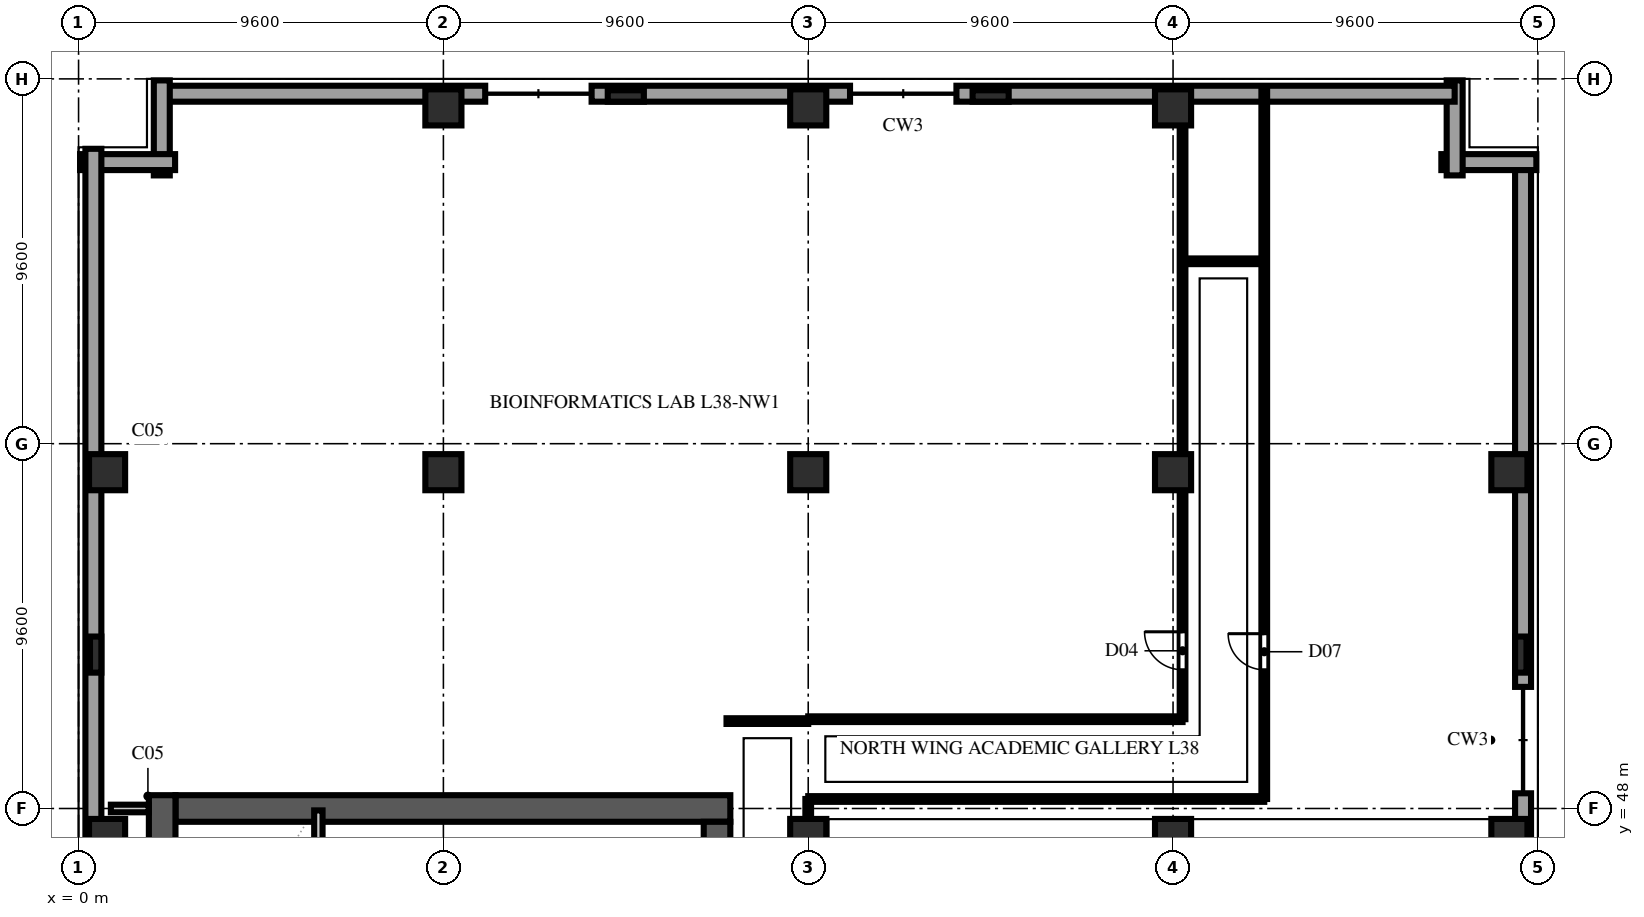
"""IFC4 building model, lengths in metres.
Left out: names, types, materials, properties, quantities, classifications, styles, units other than length and angle.
Written with IfcOpenShell. Run it as: python <this file> out.ifc"""

import sys

from ifc_helpers import new_model, si_unit, direction, frame, frame_2d, origin, origin_2d, place, context, subcontext, project, spatial, rectangle, extrude, element, fill, save


model = new_model("IFC4")
c1 = context("Model", 3, precision=1e-05, world=origin(), true_north=direction((0.0, 1.0)))
c2 = subcontext(c1, "Body", "Model", "MODEL_VIEW")
j1 = project(units=[si_unit("LENGTHUNIT", "METRE"), si_unit("PLANEANGLEUNIT", "RADIAN")], contexts=[c1])
p1 = place(None, origin())
s1 = spatial("IfcSite", under=j1, at=p1, CompositionType="ELEMENT")
p2 = place(p1, origin())
s2 = spatial("IfcBuilding", under=s1, at=p2, CompositionType="ELEMENT")
p3 = place(p2, frame((0.0, 0.0, 150.8)))
s3 = spatial("IfcBuildingStorey", under=s2, at=p3, CompositionType="ELEMENT", Elevation=150.8)
p4 = place(p3, frame((2.55, 48.0, 0.0), z_axis=(0.0, 0.0, 1.0), x_axis=(1.0, 0.0, 0.0)))
e1 = element("IfcWall", 1, at=p4, inside=s3, PredefinedType="SHEAR", context=c2, shape_type="SweptSolid", body=[
    extrude(rectangle(XDim=14.6, YDim=0.7, at=frame_2d((7.3, 0.0))), origin(), (0.0, 0.0, 1.0), 4.94),
])
p5 = place(p3, frame((2.2, 9.25, 0.0), z_axis=(0.0, 0.0, 1.0), x_axis=(0.0, 1.0, 0.0)))
e2 = element("IfcWall", 2, at=p5, inside=s3, PredefinedType="SHEAR", context=c2, shape_type="SweptSolid", body=[
    extrude(rectangle(XDim=39.1, YDim=0.7, at=frame_2d((19.55, 0.0))), origin(), (0.0, 0.0, 1.0), 4.94),
])
p6 = place(p3, frame((16.8, 36.4, 0.0), z_axis=(0.0, 0.0, 1.0), x_axis=(0.0, 1.0, 0.0)))
e3 = element("IfcWall", 3, at=p6, inside=s3, PredefinedType="SHEAR", context=c2, shape_type="SweptSolid", body=[
    extrude(rectangle(XDim=11.25, YDim=0.7, at=frame_2d((5.625, 0.0))), origin(), (0.0, 0.0, 1.0), 4.94),
])
p7 = place(p6, frame((9.2, 0.0, 0.0)))
e4 = element("IfcOpeningElement", 4, at=p7, cuts=e3, PredefinedType="OPENING", context=c2, shape_type="SweptSolid", body=[
    extrude(rectangle(XDim=0.95, YDim=2.15, at=frame_2d((0.475, 1.075))), frame((0.0, 0.362, 0.0), z_axis=(0.0, -1.0, 0.0), x_axis=(1.0, 0.0, 0.0)), (0.0, 0.0, 1.0), 0.724),
])
for number, where, z_axis, x_axis in (
    (5, (0.75, 47.25, 0.0), (0.0, 0.0, 1.0), (1.0, 0.0, 0.0)),
    (6, (0.75, 56.85, 0.0), (0.0, 0.0, 1.0), (1.0, 0.0, 0.0)),
    (7, (9.6, 56.85, 0.0), (0.0, 0.0, 1.0), (1.0, 0.0, 0.0)),
    (8, (9.6, 66.45, 0.0), (0.0, 0.0, 1.0), (1.0, 0.0, 0.0)),
    (9, (19.2, 47.25, 0.0), (0.0, 0.0, 1.0), (1.0, 0.0, 0.0)),
    (10, (19.2, 56.85, 0.0), (0.0, 0.0, 1.0), (1.0, 0.0, 0.0)),
    (11, (19.2, 66.45, 0.0), (0.0, 0.0, 1.0), (1.0, 0.0, 0.0)),
    (12, (28.8, 47.25, 0.0), (0.0, 0.0, 1.0), (1.0, 0.0, 0.0)),
    (13, (28.8, 56.85, 0.0), (0.0, 0.0, 1.0), (1.0, 0.0, 0.0)),
    (14, (28.8, 66.45, 0.0), (0.0, 0.0, 1.0), (1.0, 0.0, 0.0)),
    (15, (37.65, 47.25, 0.0), (0.0, 0.0, 1.0), (1.0, 0.0, 0.0)),
    (16, (37.65, 56.85, 0.0), (0.0, 0.0, 1.0), (1.0, 0.0, 0.0)),
):
    element("IfcColumn", number, at=place(p3, frame(where, z_axis=z_axis, x_axis=x_axis)), inside=s3, PredefinedType="COLUMN", context=c2, shape_type="SweptSolid", body=[
        extrude(rectangle(XDim=0.95, YDim=0.95, at=origin_2d()), origin(), (0.0, 0.0, 1.0), 5.2),
    ])
for number, where, z_axis, x_axis in (
    (17, (0.45, 52.05, 0.0), (0.0, 0.0, 1.0), (0.0, 1.0, 0.0)),
    (18, (14.4, 66.75, 0.0), (0.0, 0.0, 1.0), (1.0, 0.0, 0.0)),
    (19, (24.0, 66.75, 0.0), (0.0, 0.0, 1.0), (1.0, 0.0, 0.0)),
    (20, (37.95, 52.05, 0.0), (0.0, 0.0, 1.0), (0.0, 1.0, 0.0)),
):
    element("IfcColumn", number, at=place(p3, frame(where, z_axis=z_axis, x_axis=x_axis)), inside=s3, PredefinedType="PILASTER", context=c2, shape_type="SweptSolid", body=[
        extrude(rectangle(XDim=0.95, YDim=0.3, at=origin_2d()), origin(), (0.0, 0.0, 1.0), 5.2),
    ])
p8 = place(p3, frame((38.01, 41.6, 0.0), z_axis=(0.0, 0.0, 1.0), x_axis=(0.0, 1.0, 0.0)))
e21 = element("IfcWall", 21, at=p8, inside=s3, PredefinedType="SOLIDWALL", context=c2, shape_type="SweptSolid", body=[
    extrude(rectangle(XDim=6.8, YDim=0.42, at=frame_2d((3.4, 0.0))), origin(), (0.0, 0.0, 1.0), 4.94),
])
p9 = place(p3, frame((38.01, 51.2, 0.0), z_axis=(0.0, 0.0, 1.0), x_axis=(0.0, 1.0, 0.0)))
e22 = element("IfcWall", 22, at=p9, inside=s3, PredefinedType="SOLIDWALL", context=c2, shape_type="SweptSolid", body=[
    extrude(rectangle(XDim=13.81, YDim=0.42, at=frame_2d((6.905, 0.0))), origin(), (0.0, 0.0, 1.0), 4.94),
])
for number, where, z_axis, x_axis in (
    (23, (38.36, 65.01, 0.0), (0.0, 0.0, 1.0), (-1.0, 0.0, 0.0)),
    (24, (36.21, 64.66, 0.0), (0.0, 0.0, 1.0), (0.0, 1.0, 0.0)),
):
    element("IfcWall", number, at=place(p3, frame(where, z_axis=z_axis, x_axis=x_axis)), inside=s3, PredefinedType="SOLIDWALL", context=c2, shape_type="SweptSolid", body=[
        extrude(rectangle(XDim=2.5, YDim=0.42, at=frame_2d((1.25, 0.0))), origin(), (0.0, 0.0, 1.0), 4.94),
    ])
p10 = place(p3, frame((36.21, 66.81, 0.0), z_axis=(0.0, 0.0, 1.0), x_axis=(-1.0, 0.0, 0.0)))
e25 = element("IfcWall", 25, at=p10, inside=s3, PredefinedType="SOLIDWALL", context=c2, shape_type="SweptSolid", body=[
    extrude(rectangle(XDim=13.11, YDim=0.42, at=frame_2d((6.555, 0.0))), origin(), (0.0, 0.0, 1.0), 4.94),
])
p11 = place(p3, frame((20.3, 66.81, 0.0), z_axis=(0.0, 0.0, 1.0), x_axis=(-1.0, 0.0, 0.0)))
e26 = element("IfcWall", 26, at=p11, inside=s3, PredefinedType="SOLIDWALL", context=c2, shape_type="SweptSolid", body=[
    extrude(rectangle(XDim=6.8, YDim=0.42, at=frame_2d((3.4, 0.0))), origin(), (0.0, 0.0, 1.0), 4.94),
])
p12 = place(p3, frame((10.7, 66.81, 0.0), z_axis=(0.0, 0.0, 1.0), x_axis=(-1.0, 0.0, 0.0)))
e27 = element("IfcWall", 27, at=p12, inside=s3, PredefinedType="SOLIDWALL", context=c2, shape_type="SweptSolid", body=[
    extrude(rectangle(XDim=8.51, YDim=0.42, at=frame_2d((4.255, 0.0))), origin(), (0.0, 0.0, 1.0), 4.94),
])
for number, where, z_axis, x_axis in (
    (28, (2.19, 67.16, 0.0), (0.0, 0.0, 1.0), (0.0, -1.0, 0.0)),
    (29, (2.54, 65.01, 0.0), (0.0, 0.0, 1.0), (-1.0, 0.0, 0.0)),
):
    element("IfcWall", number, at=place(p3, frame(where, z_axis=z_axis, x_axis=x_axis)), inside=s3, PredefinedType="SOLIDWALL", context=c2, shape_type="SweptSolid", body=[
        extrude(rectangle(XDim=2.5, YDim=0.42, at=frame_2d((1.25, 0.0))), origin(), (0.0, 0.0, 1.0), 4.94),
    ])
p13 = place(p3, frame((0.39, 65.36, 0.0), z_axis=(0.0, 0.0, 1.0), x_axis=(0.0, -1.0, 0.0)))
e30 = element("IfcWall", 30, at=p13, inside=s3, PredefinedType="SOLIDWALL", context=c2, shape_type="SweptSolid", body=[
    extrude(rectangle(XDim=63.52, YDim=0.42, at=frame_2d((31.76, 0.0))), origin(), (0.0, 0.0, 1.0), 4.94),
])
p14 = place(p13, frame((32.76, 0.0, 0.75)))
e31 = element("IfcOpeningElement", 31, at=p14, cuts=e30, PredefinedType="OPENING", context=c2, shape_type="SweptSolid", body=[
    extrude(rectangle(XDim=2.8, YDim=2.3, at=frame_2d((1.4, 1.15))), frame((0.0, 0.222, 0.0), z_axis=(0.0, -1.0, 0.0), x_axis=(1.0, 0.0, 0.0)), (0.0, 0.0, 1.0), 0.444),
])
p15 = place(p13, frame((37.56, 0.0, 0.75)))
e32 = element("IfcOpeningElement", 32, at=p15, cuts=e30, PredefinedType="OPENING", context=c2, shape_type="SweptSolid", body=[
    extrude(rectangle(XDim=2.8, YDim=2.3, at=frame_2d((1.4, 1.15))), frame((0.0, 0.222, 0.0), z_axis=(0.0, -1.0, 0.0), x_axis=(1.0, 0.0, 0.0)), (0.0, 0.0, 1.0), 0.444),
])
p16 = place(p13, frame((42.36, 0.0, 0.75)))
e33 = element("IfcOpeningElement", 33, at=p16, cuts=e30, PredefinedType="OPENING", context=c2, shape_type="SweptSolid", body=[
    extrude(rectangle(XDim=2.8, YDim=2.3, at=frame_2d((1.4, 1.15))), frame((0.0, 0.222, 0.0), z_axis=(0.0, -1.0, 0.0), x_axis=(1.0, 0.0, 0.0)), (0.0, 0.0, 1.0), 0.444),
])
p17 = place(p13, frame((47.16, 0.0, 0.75)))
e34 = element("IfcOpeningElement", 34, at=p17, cuts=e30, PredefinedType="OPENING", context=c2, shape_type="SweptSolid", body=[
    extrude(rectangle(XDim=2.8, YDim=2.3, at=frame_2d((1.4, 1.15))), frame((0.0, 0.222, 0.0), z_axis=(0.0, -1.0, 0.0), x_axis=(1.0, 0.0, 0.0)), (0.0, 0.0, 1.0), 0.444),
])
p18 = place(p13, frame((51.96, 0.0, 0.75)))
e35 = element("IfcOpeningElement", 35, at=p18, cuts=e30, PredefinedType="OPENING", context=c2, shape_type="SweptSolid", body=[
    extrude(rectangle(XDim=2.8, YDim=2.3, at=frame_2d((1.4, 1.15))), frame((0.0, 0.222, 0.0), z_axis=(0.0, -1.0, 0.0), x_axis=(1.0, 0.0, 0.0)), (0.0, 0.0, 1.0), 0.444),
])
p19 = place(p13, frame((56.76, 0.0, 0.75)))
e36 = element("IfcOpeningElement", 36, at=p19, cuts=e30, PredefinedType="OPENING", context=c2, shape_type="SweptSolid", body=[
    extrude(rectangle(XDim=2.8, YDim=2.3, at=frame_2d((1.4, 1.15))), frame((0.0, 0.222, 0.0), z_axis=(0.0, -1.0, 0.0), x_axis=(1.0, 0.0, 0.0)), (0.0, 0.0, 1.0), 0.444),
])
p20 = place(p3, frame((6.31, 40.14, 0.0), z_axis=(0.0, 0.0, 1.0), x_axis=(0.0, 1.0, 0.0)))
e37 = element("IfcWall", 37, at=p20, inside=s3, PredefinedType="SOLIDWALL", context=c2, shape_type="SweptSolid", body=[
    extrude(rectangle(XDim=7.81, YDim=0.22, at=frame_2d((3.905, 0.0))), origin(), (0.0, 0.0, 1.0), 4.94),
])
p21 = place(p3, frame((0.85, 48.0, 0.0), z_axis=(0.0, 0.0, 1.0), x_axis=(1.0, 0.0, 0.0)))
e38 = element("IfcWall", 38, at=p21, inside=s3, PredefinedType="SOLIDWALL", context=c2, shape_type="SweptSolid", body=[
    extrude(rectangle(XDim=0.995, YDim=0.2, at=frame_2d((0.498, 0.0))), origin(), (0.0, 0.0, 1.0), 4.94),
])
p22 = place(p3, frame((17.05, 50.3, 0.0), z_axis=(0.0, 0.0, 1.0), x_axis=(1.0, 0.0, 0.0)))
e39 = element("IfcWall", 39, at=p22, inside=s3, PredefinedType="PARTITIONING", context=c2, shape_type="SweptSolid", body=[
    extrude(rectangle(XDim=2.15, YDim=0.15, at=frame_2d((1.075, 0.0))), origin(), (0.0, 0.0, 1.0), 4.94),
])
p23 = place(p3, frame((19.2, 38.18, 0.0), z_axis=(0.0, 0.0, 1.0), x_axis=(0.0, 1.0, 0.0)))
e40 = element("IfcWall", 40, at=p23, inside=s3, PredefinedType="PARTITIONING", context=c2, shape_type="SweptSolid", body=[
    extrude(rectangle(XDim=10.07, YDim=0.15, at=frame_2d((5.035, 0.0))), origin(), (0.0, 0.0, 1.0), 4.245),
])
p24 = place(p23, frame((3.6, 0.0, 0.0)))
e41 = element("IfcOpeningElement", 41, at=p24, cuts=e40, PredefinedType="OPENING", context=c2, shape_type="SweptSolid", body=[
    extrude(rectangle(XDim=1.2, YDim=2.2, at=frame_2d((0.6, 1.1))), frame((0.0, 0.087, 0.0), z_axis=(0.0, -1.0, 0.0), x_axis=(1.0, 0.0, 0.0)), (0.0, 0.0, 1.0), 0.174),
])
p25 = place(p3, frame((19.2, 48.25, 0.0), z_axis=(0.0, 0.0, 1.0), x_axis=(1.0, 0.0, 0.0)))
e42 = element("IfcWall", 42, at=p25, inside=s3, PredefinedType="PARTITIONING", context=c2, shape_type="SweptSolid", body=[
    extrude(rectangle(XDim=12.0, YDim=0.15, at=frame_2d((6.0, 0.0))), origin(), (0.0, 0.0, 1.0), 4.94),
])
p26 = place(p3, frame((19.2, 50.35, 0.0), z_axis=(0.0, 0.0, 1.0), x_axis=(1.0, 0.0, 0.0)))
e43 = element("IfcWall", 43, at=p26, inside=s3, PredefinedType="PARTITIONING", context=c2, shape_type="SweptSolid", body=[
    extrude(rectangle(XDim=9.85, YDim=0.15, at=frame_2d((4.925, 0.0))), origin(), (0.0, 0.0, 1.0), 4.94),
])
p27 = place(p3, frame((29.05, 62.4, 0.0), z_axis=(0.0, 0.0, 1.0), x_axis=(1.0, 0.0, 0.0)))
e44 = element("IfcWall", 44, at=p27, inside=s3, PredefinedType="PARTITIONING", context=c2, shape_type="SweptSolid", body=[
    extrude(rectangle(XDim=2.15, YDim=0.15, at=frame_2d((1.075, 0.0))), origin(), (0.0, 0.0, 1.0), 4.94),
])
p28 = place(p3, frame((31.2, 48.25, 0.0), z_axis=(0.0, 0.0, 1.0), x_axis=(0.0, 1.0, 0.0)))
e45 = element("IfcWall", 45, at=p28, inside=s3, PredefinedType="PARTITIONING", context=c2, shape_type="SweptSolid", body=[
    extrude(rectangle(XDim=18.73, YDim=0.15, at=frame_2d((9.365, 0.0))), origin(), (0.0, 0.0, 1.0), 4.94),
])
p29 = place(p28, frame((3.4, 0.0, 0.0)))
e46 = element("IfcOpeningElement", 46, at=p29, cuts=e45, PredefinedType="OPENING", context=c2, shape_type="SweptSolid", body=[
    extrude(rectangle(XDim=0.95, YDim=2.15, at=frame_2d((0.475, 1.075))), frame((0.0, 0.087, 0.0), z_axis=(0.0, -1.0, 0.0), x_axis=(1.0, 0.0, 0.0)), (0.0, 0.0, 1.0), 0.174),
])
p30 = place(p3, frame((29.05, 50.35, 0.0), z_axis=(0.0, 0.0, 1.0), x_axis=(0.0, 1.0, 0.0)))
e47 = element("IfcWall", 47, at=p30, inside=s3, PredefinedType="PARTITIONING", context=c2, shape_type="SweptSolid", body=[
    extrude(rectangle(XDim=16.63, YDim=0.15, at=frame_2d((8.315, 0.0))), origin(), (0.0, 0.0, 1.0), 4.94),
])
p31 = place(p30, frame((1.3, 0.0, 0.0)))
e48 = element("IfcOpeningElement", 48, at=p31, cuts=e47, PredefinedType="OPENING", context=c2, shape_type="SweptSolid", body=[
    extrude(rectangle(XDim=1.0, YDim=2.2, at=frame_2d((0.5, 1.1))), frame((0.0, 0.087, 0.0), z_axis=(0.0, -1.0, 0.0), x_axis=(1.0, 0.0, 0.0)), (0.0, 0.0, 1.0), 0.174),
])
p32 = place(p29, origin())
e49 = element("IfcDoor", 49, at=p32, inside=s3, OperationType="SINGLE_SWING_RIGHT", PredefinedType="DOOR", context=c2, shape_type="SweptSolid", body=[
    extrude(rectangle(XDim=0.95, YDim=2.15, at=frame_2d((0.475, 1.075))), frame((0.0, 0.025, 0.0), z_axis=(0.0, -1.0, 0.0), x_axis=(1.0, 0.0, 0.0)), (0.0, 0.0, 1.0), 0.05),
])
fill(e46, e49)
p33 = place(p31, origin())
e50 = element("IfcDoor", 50, at=p33, inside=s3, OperationType="SINGLE_SWING_RIGHT", PredefinedType="DOOR", context=c2, shape_type="SweptSolid", body=[
    extrude(rectangle(XDim=1.0, YDim=2.2, at=frame_2d((0.5, 1.1))), frame((0.0, 0.025, 0.0), z_axis=(0.0, -1.0, 0.0), x_axis=(1.0, 0.0, 0.0)), (0.0, 0.0, 1.0), 0.05),
])
fill(e48, e50)
save(model, sys.argv[1])
